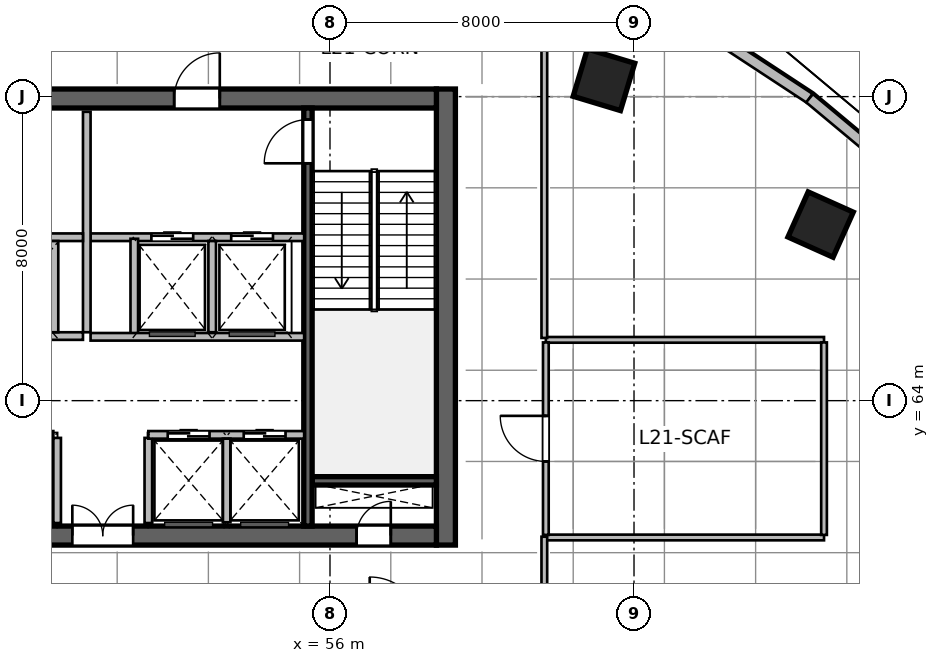
"""IFC4 building model, lengths in metres.
Left out: names, types, materials, properties, quantities, classifications, styles, units other than length and angle.
Written with IfcOpenShell. Run it as: python <this file> out.ifc"""

import sys

from ifc_helpers import new_model, si_unit, direction, frame, frame_2d, origin, origin_2d, place, context, subcontext, project, spatial, rectangle, extrude, source, transform, mapped, element, fill, save


model = new_model("IFC4")
c1 = context("Model", 3, precision=1e-05, world=origin(), true_north=direction((0.0, 1.0)))
c2 = subcontext(c1, "Body", "Model", "MODEL_VIEW")
j1 = project(units=[si_unit("LENGTHUNIT", "METRE"), si_unit("PLANEANGLEUNIT", "RADIAN")], contexts=[c1])
p1 = place(None, origin())
s1 = spatial("IfcSite", under=j1, at=p1, CompositionType="ELEMENT")
p2 = place(p1, origin())
s2 = spatial("IfcBuilding", under=s1, at=p2, CompositionType="ELEMENT")
p3 = place(p2, frame((0.0, 0.0, 91.2)))
s3 = spatial("IfcBuildingStorey", under=s2, at=p3, CompositionType="ELEMENT", Elevation=91.2)
m1 = source(origin(), c2, "Body", "SweptSolid", [
    extrude(rectangle(XDim=12.0, YDim=0.5, at=frame_2d((6.0, 0.0))), origin(), (0.0, 0.0, 1.0), 4.8),
])
p4 = place(p3, frame((59.05, 60.2, 0.0), z_axis=(0.0, 0.0, 1.0), x_axis=(0.0, 1.0, 0.0)))
e1 = element("IfcWall", 1, at=p4, inside=s3, PredefinedType="SHEAR", context=c2, shape_type="MappedRepresentation", body=[
    mapped(m1, transform((0.0, 0.0, 0.0), scale=1.0)),
])
m2 = source(origin(), c2, "Body", "SweptSolid", [
    extrude(rectangle(XDim=21.6, YDim=0.5, at=frame_2d((10.8, 0.0))), origin(), (0.0, 0.0, 1.0), 4.8),
])
p5 = place(p3, frame((37.2, 60.45, 0.0), z_axis=(0.0, 0.0, 1.0), x_axis=(1.0, 0.0, 0.0)))
e2 = element("IfcWall", 2, at=p5, inside=s3, PredefinedType="SHEAR", context=c2, shape_type="MappedRepresentation", body=[
    mapped(m2, transform((0.0, 0.0, 0.0), scale=1.0)),
])
p6 = place(p5, frame((1.1, 0.0, 0.0)))
e3 = element("IfcOpeningElement", 3, at=p6, cuts=e2, PredefinedType="OPENING", context=c2, shape_type="SweptSolid", body=[
    extrude(rectangle(XDim=1.15, YDim=2.15, at=frame_2d((0.575, 1.075))), frame((0.0, 0.26, 0.0), z_axis=(0.0, -1.0, 0.0), x_axis=(1.0, 0.0, 0.0)), (0.0, 0.0, 1.0), 0.52),
])
p7 = place(p5, frame((19.5, 0.0, 0.0)))
e4 = element("IfcOpeningElement", 4, at=p7, cuts=e2, PredefinedType="OPENING", context=c2, shape_type="SweptSolid", body=[
    extrude(rectangle(XDim=0.9, YDim=2.1, at=frame_2d((0.45, 1.05))), frame((0.0, 0.26, 0.0), z_axis=(0.0, -1.0, 0.0), x_axis=(1.0, 0.0, 0.0)), (0.0, 0.0, 1.0), 0.52),
])
p8 = place(p5, frame((12.02, 0.0, 0.0)))
e5 = element("IfcOpeningElement", 5, at=p8, cuts=e2, PredefinedType="OPENING", context=c2, shape_type="SweptSolid", body=[
    extrude(rectangle(XDim=1.6, YDim=2.15, at=frame_2d((0.8, 1.075))), frame((0.0, 0.26, 0.0), z_axis=(0.0, -1.0, 0.0), x_axis=(1.0, 0.0, 0.0)), (0.0, 0.0, 1.0), 0.52),
])
p9 = place(p3, frame((37.2, 71.95, 0.0), z_axis=(0.0, 0.0, 1.0), x_axis=(1.0, 0.0, 0.0)))
e6 = element("IfcWall", 6, at=p9, inside=s3, PredefinedType="SHEAR", context=c2, shape_type="MappedRepresentation", body=[
    mapped(m2, transform((0.0, 0.0, 0.0), scale=1.0)),
])
p10 = place(p9, frame((1.2, 0.0, 0.0)))
e7 = element("IfcOpeningElement", 7, at=p10, cuts=e6, PredefinedType="OPENING", context=c2, shape_type="SweptSolid", body=[
    extrude(rectangle(XDim=0.9, YDim=2.1, at=frame_2d((0.45, 1.05))), frame((0.0, 0.26, 0.0), z_axis=(0.0, -1.0, 0.0), x_axis=(1.0, 0.0, 0.0)), (0.0, 0.0, 1.0), 0.52),
])
p11 = place(p9, frame((14.7, 0.0, 0.0)))
e8 = element("IfcOpeningElement", 8, at=p11, cuts=e6, PredefinedType="OPENING", context=c2, shape_type="SweptSolid", body=[
    extrude(rectangle(XDim=1.2, YDim=2.15, at=frame_2d((0.6, 1.075))), frame((0.0, 0.26, 0.0), z_axis=(0.0, -1.0, 0.0), x_axis=(1.0, 0.0, 0.0)), (0.0, 0.0, 1.0), 0.52),
])
p12 = place(p9, frame((4.15, 0.0, 0.0)))
e9 = element("IfcOpeningElement", 9, at=p12, cuts=e6, PredefinedType="OPENING", context=c2, shape_type="SweptSolid", body=[
    extrude(rectangle(XDim=1.3, YDim=2.15, at=frame_2d((0.65, 1.075))), frame((0.0, 0.26, 0.0), z_axis=(0.0, -1.0, 0.0), x_axis=(1.0, 0.0, 0.0)), (0.0, 0.0, 1.0), 0.52),
])
p13 = place(p9, frame((7.25, 0.0, 0.0)))
e10 = element("IfcOpeningElement", 10, at=p13, cuts=e6, PredefinedType="OPENING", context=c2, shape_type="SweptSolid", body=[
    extrude(rectangle(XDim=0.9, YDim=2.1, at=frame_2d((0.45, 1.05))), frame((0.0, 0.26, 0.0), z_axis=(0.0, -1.0, 0.0), x_axis=(1.0, 0.0, 0.0)), (0.0, 0.0, 1.0), 0.52),
])
m3 = source(origin(), c2, "Body", "SweptSolid", [
    extrude(rectangle(XDim=3.27, YDim=0.22, at=frame_2d((1.635, 0.0))), origin(), (0.0, 0.0, 1.0), 4.8),
])
p14 = place(p3, frame((55.53, 61.89, 0.0), z_axis=(0.0, 0.0, 1.0), x_axis=(1.0, 0.0, 0.0)))
e11 = element("IfcWall", 11, at=p14, inside=s3, PredefinedType="SHEAR", context=c2, shape_type="MappedRepresentation", body=[
    mapped(m3, transform((0.0, 0.0, 0.0), scale=1.0)),
])
m4 = source(origin(), c2, "Body", "SweptSolid", [
    extrude(rectangle(XDim=11.0, YDim=0.22, at=frame_2d((5.5, 0.0))), origin(), (0.0, 0.0, 1.0), 4.8),
])
p15 = place(p3, frame((55.42, 60.7, 0.0), z_axis=(0.0, 0.0, 1.0), x_axis=(0.0, 1.0, 0.0)))
e12 = element("IfcWall", 12, at=p15, inside=s3, PredefinedType="SHEAR", context=c2, shape_type="MappedRepresentation", body=[
    mapped(m4, transform((0.0, 0.0, 0.0), scale=1.0)),
])
p16 = place(p15, frame((9.545, 0.0, 0.0)))
e13 = element("IfcOpeningElement", 13, at=p16, cuts=e12, PredefinedType="OPENING", context=c2, shape_type="SweptSolid", body=[
    extrude(rectangle(XDim=1.15, YDim=2.15, at=frame_2d((0.575, 1.075))), frame((0.0, 0.12, 0.0), z_axis=(0.0, -1.0, 0.0), x_axis=(1.0, 0.0, 0.0)), (0.0, 0.0, 1.0), 0.24),
])
m5 = source(origin(), c2, "Body", "SweptSolid", [
    extrude(rectangle(XDim=1.3, YDim=1.3, at=origin_2d()), origin(), (0.0, 0.0, 1.0), 4.8),
])
for number, where, z_axis, x_axis in (
    (14, (63.209, 72.442, 0.0), (0.0, 0.0, 1.0), (0.289, 0.957, 0.0)),
    (15, (68.91, 68.633, 0.0), (0.0, 0.0, 1.0), (0.409, 0.912, 0.0)),
):
    element("IfcColumn", number, at=place(p3, frame(where, z_axis=z_axis, x_axis=x_axis)), inside=s3, PredefinedType="COLUMN", context=c2, shape_type="MappedRepresentation", body=[
        mapped(m5, transform((0.0, 0.0, 0.0), scale=1.0)),
    ])
m6 = source(origin(), c2, "Body", "SweptSolid", [
    extrude(rectangle(XDim=4.626, YDim=0.28, at=frame_2d((2.313, 0.0))), origin(), (0.0, 0.0, 1.0), 4.55),
])
p17 = place(p3, frame((64.751, 74.496, 0.0), z_axis=(0.0, 0.0, 1.0), x_axis=(0.83595938331, -0.548791316855, 0.0)))
e16 = element("IfcWall", 16, at=p17, inside=s3, PredefinedType="SOLIDWALL", context=c2, shape_type="MappedRepresentation", body=[
    mapped(m6, transform((0.0, 0.0, 0.0), scale=1.0)),
])
m7 = source(origin(), c2, "Body", "SweptSolid", [
    extrude(rectangle(XDim=4.762, YDim=0.28, at=frame_2d((2.381, 0.0))), origin(), (0.0, 0.0, 1.0), 4.55),
])
p18 = place(p3, frame((68.618, 71.958, 0.0), z_axis=(0.0, 0.0, 1.0), x_axis=(0.767952279762, -0.640507061638, 0.0)))
e17 = element("IfcWall", 17, at=p18, inside=s3, PredefinedType="SOLIDWALL", context=c2, shape_type="MappedRepresentation", body=[
    mapped(m7, transform((0.0, 0.0, 0.0), scale=1.0)),
])
m8 = source(origin(), c2, "Body", "SweptSolid", [
    extrude(rectangle(XDim=2.24, YDim=0.2, at=frame_2d((1.12, 0.0))), origin(), (0.0, 0.0, 1.0), 4.55),
])
for number, where, z_axis, x_axis in (
    (18, (48.82, 60.78, 0.0), (0.0, 0.0, 1.0), (0.0, 1.0, 0.0)),
    (19, (51.22, 60.78, 0.0), (0.0, 0.0, 1.0), (0.0, 1.0, 0.0)),
):
    element("IfcWall", number, at=place(p3, frame(where, z_axis=z_axis, x_axis=x_axis)), inside=s3, PredefinedType="SOLIDWALL", context=c2, shape_type="MappedRepresentation", body=[
        mapped(m8, transform((0.0, 0.0, 0.0), scale=1.0)),
    ])
m9 = source(origin(), c2, "Body", "SweptSolid", [
    extrude(rectangle(XDim=5.62, YDim=0.2, at=frame_2d((2.81, 0.0))), origin(), (0.0, 0.0, 1.0), 4.55),
])
p19 = place(p3, frame((49.7, 68.3, 0.0), z_axis=(0.0, 0.0, 1.0), x_axis=(1.0, 0.0, 0.0)))
e20 = element("IfcWall", 20, at=p19, inside=s3, PredefinedType="SOLIDWALL", context=c2, shape_type="MappedRepresentation", body=[
    mapped(m9, transform((0.0, 0.0, 0.0), scale=1.0)),
])
p20 = place(p19, frame((1.6, 0.0, 0.0)))
e21 = element("IfcOpeningElement", 21, at=p20, cuts=e20, PredefinedType="OPENING", context=c2, shape_type="SweptSolid", body=[
    extrude(rectangle(XDim=1.1, YDim=2.15, at=frame_2d((0.55, 1.075))), frame((0.0, 0.11, 0.0), z_axis=(0.0, -1.0, 0.0), x_axis=(1.0, 0.0, 0.0)), (0.0, 0.0, 1.0), 0.22),
])
p21 = place(p19, frame((3.7, 0.0, 0.0)))
e22 = element("IfcOpeningElement", 22, at=p21, cuts=e20, PredefinedType="OPENING", context=c2, shape_type="SweptSolid", body=[
    extrude(rectangle(XDim=1.1, YDim=2.15, at=frame_2d((0.55, 1.075))), frame((0.0, 0.11, 0.0), z_axis=(0.0, -1.0, 0.0), x_axis=(1.0, 0.0, 0.0)), (0.0, 0.0, 1.0), 0.22),
])
m10 = source(origin(), c2, "Body", "SweptSolid", [
    extrude(rectangle(XDim=5.8, YDim=0.2, at=frame_2d((2.9, 0.0))), origin(), (0.0, 0.0, 1.0), 4.55),
])
p22 = place(p3, frame((49.6, 65.8, 0.0), z_axis=(0.0, 0.0, 1.0), x_axis=(0.0, 1.0, 0.0)))
e23 = element("IfcWall", 23, at=p22, inside=s3, PredefinedType="SOLIDWALL", context=c2, shape_type="MappedRepresentation", body=[
    mapped(m10, transform((0.0, 0.0, 0.0), scale=1.0)),
])
m11 = source(origin(), c2, "Body", "SweptSolid", [
    extrude(rectangle(XDim=2.58, YDim=0.2, at=frame_2d((1.29, 0.0))), origin(), (0.0, 0.0, 1.0), 4.55),
])
p23 = place(p3, frame((50.85, 65.68, 0.0), z_axis=(0.0, 0.0, 1.0), x_axis=(0.0, 1.0, 0.0)))
e24 = element("IfcWall", 24, at=p23, inside=s3, PredefinedType="SOLIDWALL", context=c2, shape_type="MappedRepresentation", body=[
    mapped(m11, transform((0.0, 0.0, 0.0), scale=1.0)),
])
m12 = source(origin(), c2, "Body", "SweptSolid", [
    extrude(rectangle(XDim=2.4, YDim=0.2, at=frame_2d((1.2, 0.0))), origin(), (0.0, 0.0, 1.0), 4.55),
])
p24 = place(p3, frame((52.9, 65.8, 0.0), z_axis=(0.0, 0.0, 1.0), x_axis=(0.0, 1.0, 0.0)))
e25 = element("IfcWall", 25, at=p24, inside=s3, PredefinedType="SOLIDWALL", context=c2, shape_type="MappedRepresentation", body=[
    mapped(m12, transform((0.0, 0.0, 0.0), scale=1.0)),
])
p25 = place(p3, frame((49.7, 65.68, 0.0), z_axis=(0.0, 0.0, 1.0), x_axis=(1.0, 0.0, 0.0)))
e26 = element("IfcWall", 26, at=p25, inside=s3, PredefinedType="SOLIDWALL", context=c2, shape_type="MappedRepresentation", body=[
    mapped(m9, transform((0.0, 0.0, 0.0), scale=1.0)),
])
m13 = source(origin(), c2, "Body", "SweptSolid", [
    extrude(rectangle(XDim=8.8, YDim=0.2, at=frame_2d((4.4, 0.0))), origin(), (0.0, 0.0, 1.0), 4.55),
])
p26 = place(p3, frame((40.7, 68.3, 0.0), z_axis=(0.0, 0.0, 1.0), x_axis=(1.0, 0.0, 0.0)))
e27 = element("IfcWall", 27, at=p26, inside=s3, PredefinedType="SOLIDWALL", context=c2, shape_type="MappedRepresentation", body=[
    mapped(m13, transform((0.0, 0.0, 0.0), scale=1.0)),
])
m14 = source(origin(), c2, "Body", "SweptSolid", [
    extrude(rectangle(XDim=8.02, YDim=0.2, at=frame_2d((4.01, 0.0))), origin(), (0.0, 0.0, 1.0), 4.55),
])
p27 = place(p3, frame((40.7, 63.1, 0.0), z_axis=(0.0, 0.0, 1.0), x_axis=(1.0, 0.0, 0.0)))
e28 = element("IfcWall", 28, at=p27, inside=s3, PredefinedType="SOLIDWALL", context=c2, shape_type="MappedRepresentation", body=[
    mapped(m14, transform((0.0, 0.0, 0.0), scale=1.0)),
])
p28 = place(p27, frame((0.72, 0.0, 0.0)))
e29 = element("IfcOpeningElement", 29, at=p28, cuts=e28, PredefinedType="OPENING", context=c2, shape_type="SweptSolid", body=[
    extrude(rectangle(XDim=1.0, YDim=2.15, at=frame_2d((0.5, 1.075))), frame((0.0, 0.11, 0.0), z_axis=(0.0, -1.0, 0.0), x_axis=(1.0, 0.0, 0.0)), (0.0, 0.0, 1.0), 0.22),
])
p29 = place(p27, frame((2.62, 0.0, 0.0)))
e30 = element("IfcOpeningElement", 30, at=p29, cuts=e28, PredefinedType="OPENING", context=c2, shape_type="SweptSolid", body=[
    extrude(rectangle(XDim=1.0, YDim=2.15, at=frame_2d((0.5, 1.075))), frame((0.0, 0.11, 0.0), z_axis=(0.0, -1.0, 0.0), x_axis=(1.0, 0.0, 0.0)), (0.0, 0.0, 1.0), 0.22),
])
p30 = place(p27, frame((4.55, 0.0, 0.0)))
e31 = element("IfcOpeningElement", 31, at=p30, cuts=e28, PredefinedType="OPENING", context=c2, shape_type="SweptSolid", body=[
    extrude(rectangle(XDim=1.0, YDim=2.15, at=frame_2d((0.5, 1.075))), frame((0.0, 0.11, 0.0), z_axis=(0.0, -1.0, 0.0), x_axis=(1.0, 0.0, 0.0)), (0.0, 0.0, 1.0), 0.22),
])
p31 = place(p27, frame((6.55, 0.0, 0.0)))
e32 = element("IfcOpeningElement", 32, at=p31, cuts=e28, PredefinedType="OPENING", context=c2, shape_type="SweptSolid", body=[
    extrude(rectangle(XDim=1.0, YDim=2.15, at=frame_2d((0.5, 1.075))), frame((0.0, 0.11, 0.0), z_axis=(0.0, -1.0, 0.0), x_axis=(1.0, 0.0, 0.0)), (0.0, 0.0, 1.0), 0.22),
])
m15 = source(origin(), c2, "Body", "SweptSolid", [
    extrude(rectangle(XDim=4.1, YDim=0.2, at=frame_2d((2.05, 0.0))), origin(), (0.0, 0.0, 1.0), 4.55),
])
p32 = place(p3, frame((51.22, 63.1, 0.0), z_axis=(0.0, 0.0, 1.0), x_axis=(1.0, 0.0, 0.0)))
e33 = element("IfcWall", 33, at=p32, inside=s3, PredefinedType="SOLIDWALL", context=c2, shape_type="MappedRepresentation", body=[
    mapped(m15, transform((0.0, 0.0, 0.0), scale=1.0)),
])
p33 = place(p32, frame((0.51, 0.0, 0.0)))
e34 = element("IfcOpeningElement", 34, at=p33, cuts=e33, PredefinedType="OPENING", context=c2, shape_type="SweptSolid", body=[
    extrude(rectangle(XDim=1.1, YDim=2.15, at=frame_2d((0.55, 1.075))), frame((0.0, 0.11, 0.0), z_axis=(0.0, -1.0, 0.0), x_axis=(1.0, 0.0, 0.0)), (0.0, 0.0, 1.0), 0.22),
])
p34 = place(p32, frame((2.51, 0.0, 0.0)))
e35 = element("IfcOpeningElement", 35, at=p34, cuts=e33, PredefinedType="OPENING", context=c2, shape_type="SweptSolid", body=[
    extrude(rectangle(XDim=1.1, YDim=2.15, at=frame_2d((0.55, 1.075))), frame((0.0, 0.11, 0.0), z_axis=(0.0, -1.0, 0.0), x_axis=(1.0, 0.0, 0.0)), (0.0, 0.0, 1.0), 0.22),
])
m16 = source(origin(), c2, "Body", "SweptSolid", [
    extrude(rectangle(XDim=2.2, YDim=0.2, at=frame_2d((1.1, 0.0))), origin(), (0.0, 0.0, 1.0), 4.55),
])
p35 = place(p3, frame((53.28, 60.8, 0.0), z_axis=(0.0, 0.0, 1.0), x_axis=(0.0, 1.0, 0.0)))
e36 = element("IfcWall", 36, at=p35, inside=s3, PredefinedType="SOLIDWALL", context=c2, shape_type="MappedRepresentation", body=[
    mapped(m16, transform((0.0, 0.0, 0.0), scale=1.0)),
])
p36 = place(p3, frame((40.7, 65.7, 0.0), z_axis=(0.0, 0.0, 1.0), x_axis=(1.0, 0.0, 0.0)))
e37 = element("IfcWall", 37, at=p36, inside=s3, PredefinedType="SOLIDWALL", context=c2, shape_type="MappedRepresentation", body=[
    mapped(m13, transform((0.0, 0.0, 0.0), scale=1.0)),
])
p37 = place(p36, frame((0.72, 0.0, 0.0)))
e38 = element("IfcOpeningElement", 38, at=p37, cuts=e37, PredefinedType="OPENING", context=c2, shape_type="SweptSolid", body=[
    extrude(rectangle(XDim=1.0, YDim=2.15, at=frame_2d((0.5, 1.075))), frame((0.0, 0.11, 0.0), z_axis=(0.0, -1.0, 0.0), x_axis=(1.0, 0.0, 0.0)), (0.0, 0.0, 1.0), 0.22),
])
p38 = place(p36, frame((2.62, 0.0, 0.0)))
e39 = element("IfcOpeningElement", 39, at=p38, cuts=e37, PredefinedType="OPENING", context=c2, shape_type="SweptSolid", body=[
    extrude(rectangle(XDim=1.0, YDim=2.15, at=frame_2d((0.5, 1.075))), frame((0.0, 0.11, 0.0), z_axis=(0.0, -1.0, 0.0), x_axis=(1.0, 0.0, 0.0)), (0.0, 0.0, 1.0), 0.22),
])
p39 = place(p36, frame((4.55, 0.0, 0.0)))
e40 = element("IfcOpeningElement", 40, at=p39, cuts=e37, PredefinedType="OPENING", context=c2, shape_type="SweptSolid", body=[
    extrude(rectangle(XDim=1.0, YDim=2.15, at=frame_2d((0.5, 1.075))), frame((0.0, 0.11, 0.0), z_axis=(0.0, -1.0, 0.0), x_axis=(1.0, 0.0, 0.0)), (0.0, 0.0, 1.0), 0.22),
])
p40 = place(p36, frame((6.55, 0.0, 0.0)))
e41 = element("IfcOpeningElement", 41, at=p40, cuts=e37, PredefinedType="OPENING", context=c2, shape_type="SweptSolid", body=[
    extrude(rectangle(XDim=1.0, YDim=2.15, at=frame_2d((0.5, 1.075))), frame((0.0, 0.11, 0.0), z_axis=(0.0, -1.0, 0.0), x_axis=(1.0, 0.0, 0.0)), (0.0, 0.0, 1.0), 0.22),
])
p41 = place(p3, frame((48.75, 65.8, 0.0), z_axis=(0.0, 0.0, 1.0), x_axis=(0.0, 1.0, 0.0)))
e42 = element("IfcWall", 42, at=p41, inside=s3, PredefinedType="SOLIDWALL", context=c2, shape_type="MappedRepresentation", body=[
    mapped(m12, transform((0.0, 0.0, 0.0), scale=1.0)),
])
m17 = source(origin(), c2, "Body", "SweptSolid", [
    extrude(rectangle(XDim=7.32, YDim=0.15, at=frame_2d((3.66, 0.0))), origin(), (0.0, 0.0, 1.0), 4.55),
])
for number, where, z_axis, x_axis in (
    (43, (61.68, 60.4, 0.0), (0.0, 0.0, 1.0), (1.0, 0.0, 0.0)),
    (44, (61.68, 65.6, 0.0), (0.0, 0.0, 1.0), (1.0, 0.0, 0.0)),
):
    element("IfcWall", number, at=place(p3, frame(where, z_axis=z_axis, x_axis=x_axis)), inside=s3, PredefinedType="PARTITIONING", context=c2, shape_type="MappedRepresentation", body=[
        mapped(m17, transform((0.0, 0.0, 0.0), scale=1.0)),
    ])
m18 = source(origin(), c2, "Body", "SweptSolid", [
    extrude(rectangle(XDim=5.065, YDim=0.15, at=frame_2d((2.532, 0.0))), origin(), (0.0, 0.0, 1.0), 4.55),
])
p42 = place(p3, frame((61.68, 60.468, 0.0), z_axis=(0.0, 0.0, 1.0), x_axis=(0.0, 1.0, 0.0)))
e45 = element("IfcWall", 45, at=p42, inside=s3, PredefinedType="PARTITIONING", context=c2, shape_type="MappedRepresentation", body=[
    mapped(m18, transform((0.0, 0.0, 0.0), scale=1.0)),
])
p43 = place(p42, frame((1.933, 0.0, 0.0)))
e46 = element("IfcOpeningElement", 46, at=p43, cuts=e45, PredefinedType="OPENING", context=c2, shape_type="SweptSolid", body=[
    extrude(rectangle(XDim=1.2, YDim=2.15, at=frame_2d((0.6, 1.075))), frame((0.0, 0.085, 0.0), z_axis=(0.0, -1.0, 0.0), x_axis=(1.0, 0.0, 0.0)), (0.0, 0.0, 1.0), 0.17),
])
p44 = place(p3, frame((69.0, 60.468, 0.0), z_axis=(0.0, 0.0, 1.0), x_axis=(0.0, 1.0, 0.0)))
e47 = element("IfcWall", 47, at=p44, inside=s3, PredefinedType="PARTITIONING", context=c2, shape_type="MappedRepresentation", body=[
    mapped(m18, transform((0.0, 0.0, 0.0), scale=1.0)),
])
m19 = source(origin(), c2, "Body", "SweptSolid", [
    extrude(rectangle(XDim=2.46, YDim=0.15, at=frame_2d((1.23, 0.0))), origin(), (0.0, 0.0, 1.0), 4.55),
])
p45 = place(p3, frame((61.64, 57.96, 0.0), z_axis=(0.0, 0.0, 1.0), x_axis=(0.0, 1.0, 0.0)))
e48 = element("IfcWall", 48, at=p45, inside=s3, PredefinedType="PARTITIONING", context=c2, shape_type="MappedRepresentation", body=[
    mapped(m19, transform((0.0, 0.0, 0.0), scale=1.0)),
])
m20 = source(origin(), c2, "Body", "SweptSolid", [
    extrude(rectangle(XDim=10.377, YDim=0.15, at=frame_2d((5.189, 0.0))), origin(), (0.0, 0.0, 1.0), 4.55),
])
p46 = place(p3, frame((61.64, 65.65, 0.0), z_axis=(0.0, 0.0, 1.0), x_axis=(0.0, 1.0, 0.0)))
e49 = element("IfcWall", 49, at=p46, inside=s3, PredefinedType="PARTITIONING", context=c2, shape_type="MappedRepresentation", body=[
    mapped(m20, transform((0.0, 0.0, 0.0), scale=1.0)),
])
m21 = source(origin(), c2, "Body", "SweptSolid", [
    extrude(rectangle(XDim=0.9, YDim=2.1, at=frame_2d((0.45, 1.05))), frame((0.0, 0.025, 0.0), z_axis=(0.0, -1.0, 0.0), x_axis=(1.0, 0.0, 0.0)), (0.0, 0.0, 1.0), 0.05),
])
p47 = place(p7, origin())
e50 = element("IfcDoor", 50, at=p47, inside=s3, OperationType="SINGLE_SWING_RIGHT", PredefinedType="DOOR", context=c2, shape_type="MappedRepresentation", body=[
    mapped(m21, transform((0.0, 0.0, 0.0), scale=1.0)),
])
fill(e4, e50)
m22 = source(origin(), c2, "Body", "SweptSolid", [
    extrude(rectangle(XDim=1.15, YDim=2.15, at=frame_2d((0.575, 1.075))), frame((0.0, 0.025, 0.0), z_axis=(0.0, -1.0, 0.0), x_axis=(1.0, 0.0, 0.0)), (0.0, 0.0, 1.0), 0.05),
])
p48 = place(p16, origin())
e51 = element("IfcDoor", 51, at=p48, inside=s3, OperationType="SINGLE_SWING_LEFT", PredefinedType="DOOR", context=c2, shape_type="MappedRepresentation", body=[
    mapped(m22, transform((0.0, 0.0, 0.0), scale=1.0)),
])
fill(e13, e51)
m23 = source(origin(), c2, "Body", "SweptSolid", [
    extrude(rectangle(XDim=1.6, YDim=2.15, at=frame_2d((0.8, 1.075))), frame((0.0, 0.025, 0.0), z_axis=(0.0, -1.0, 0.0), x_axis=(1.0, 0.0, 0.0)), (0.0, 0.0, 1.0), 0.05),
])
p49 = place(p8, origin())
e52 = element("IfcDoor", 52, at=p49, inside=s3, OperationType="DOUBLE_DOOR_SINGLE_SWING", PredefinedType="DOOR", context=c2, shape_type="MappedRepresentation", body=[
    mapped(m23, transform((0.0, 0.0, 0.0), scale=1.0)),
])
fill(e5, e52)
m24 = source(origin(), c2, "Body", "SweptSolid", [
    extrude(rectangle(XDim=1.2, YDim=2.15, at=frame_2d((0.6, 1.075))), frame((0.0, 0.025, 0.0), z_axis=(0.0, -1.0, 0.0), x_axis=(1.0, 0.0, 0.0)), (0.0, 0.0, 1.0), 0.05),
])
p50 = place(p11, origin())
e53 = element("IfcDoor", 53, at=p50, inside=s3, OperationType="SINGLE_SWING_RIGHT", PredefinedType="DOOR", context=c2, shape_type="MappedRepresentation", body=[
    mapped(m24, transform((0.0, 0.0, 0.0), scale=1.0)),
])
fill(e8, e53)
m25 = source(origin(), c2, "Body", "SweptSolid", [
    extrude(rectangle(XDim=1.1, YDim=2.15, at=frame_2d((0.55, 1.075))), frame((0.0, 0.025, 0.0), z_axis=(0.0, -1.0, 0.0), x_axis=(1.0, 0.0, 0.0)), (0.0, 0.0, 1.0), 0.05),
])
p51 = place(p20, origin())
e54 = element("IfcDoor", 54, at=p51, inside=s3, OperationType="DOUBLE_DOOR_SLIDING", PredefinedType="DOOR", context=c2, shape_type="MappedRepresentation", body=[
    mapped(m25, transform((0.0, 0.0, 0.0), scale=1.0)),
])
fill(e21, e54)
p52 = place(p21, origin())
e55 = element("IfcDoor", 55, at=p52, inside=s3, OperationType="DOUBLE_DOOR_SLIDING", PredefinedType="DOOR", context=c2, shape_type="MappedRepresentation", body=[
    mapped(m25, transform((0.0, 0.0, 0.0), scale=1.0)),
])
fill(e22, e55)
m26 = source(origin(), c2, "Body", "SweptSolid", [
    extrude(rectangle(XDim=1.1, YDim=2.15, at=frame_2d((0.55, 1.075))), frame((0.0, 0.025, 0.0), z_axis=(0.0, -1.0, 0.0), x_axis=(1.0, 0.0, 0.0)), (0.0, 0.0, 1.0), 0.05),
])
p53 = place(p33, origin())
e56 = element("IfcDoor", 56, at=p53, inside=s3, OperationType="DOUBLE_DOOR_SLIDING", PredefinedType="DOOR", context=c2, shape_type="MappedRepresentation", body=[
    mapped(m26, transform((0.0, 0.0, 0.0), scale=1.0)),
])
fill(e34, e56)
p54 = place(p34, origin())
e57 = element("IfcDoor", 57, at=p54, inside=s3, OperationType="DOUBLE_DOOR_SLIDING", PredefinedType="DOOR", context=c2, shape_type="MappedRepresentation", body=[
    mapped(m26, transform((0.0, 0.0, 0.0), scale=1.0)),
])
fill(e35, e57)
m27 = source(origin(), c2, "Body", "SweptSolid", [
    extrude(rectangle(XDim=1.2, YDim=2.15, at=frame_2d((0.6, 1.075))), frame((0.0, 0.025, 0.0), z_axis=(0.0, -1.0, 0.0), x_axis=(1.0, 0.0, 0.0)), (0.0, 0.0, 1.0), 0.05),
])
p55 = place(p43, origin())
e58 = element("IfcDoor", 58, at=p55, inside=s3, OperationType="SINGLE_SWING_RIGHT", PredefinedType="DOOR", context=c2, shape_type="MappedRepresentation", body=[
    mapped(m27, transform((0.0, 0.0, 0.0), scale=1.0)),
])
fill(e46, e58)
save(model, sys.argv[1])
